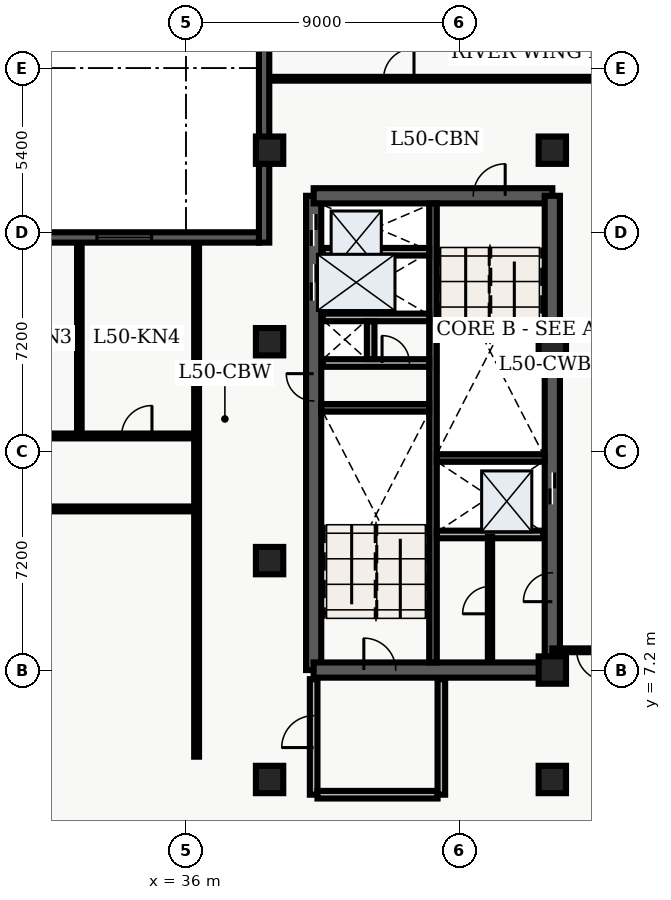
"""IFC4 building model, lengths in metres.
Left out: names, types, materials, properties, quantities, classifications, styles, units other than length and angle.
Written with IfcOpenShell. Run it as: python <this file> out.ifc"""

import sys

from ifc_helpers import new_model, entity, si_unit, converted_unit, direction, frame, origin_with_axes, origin_2d_with_axis, place, context, subcontext, project, spatial, polyline, rectangle, outline, extrude, element, fill, save


model = new_model("IFC4")
c1 = context("Model", 3, precision=1e-05, world=origin_with_axes(), true_north=direction((0.0, 1.0)))
c2 = subcontext(c1, "Body", "Model", "MODEL_VIEW")
j1 = project(units=[si_unit("LENGTHUNIT", "METRE"), converted_unit("PLANEANGLEUNIT", "DEGREE", entity("IfcPlaneAngleMeasure", 0.017), si_unit("PLANEANGLEUNIT", "RADIAN"), dimensions=[0, 0, 0, 0, 0, 0, 0])], contexts=[c1])
p1 = place(None, origin_with_axes())
s1 = spatial("IfcSite", under=j1, at=p1, CompositionType="ELEMENT")
p2 = place(p1, origin_with_axes())
s2 = spatial("IfcBuilding", under=s1, at=p2, CompositionType="ELEMENT")
p3 = place(p2, frame((0.0, 0.0, 204.3), z_axis=(0.0, 0.0, 1.0), x_axis=(1.0, 0.0, 0.0)))
s3 = spatial("IfcBuildingStorey", under=s2, at=p3, CompositionType="ELEMENT", Elevation=204.3)
p4 = place(p3, frame((40.2, 7.2, 0.0), z_axis=(0.0, 0.0, 1.0), x_axis=(0.0, 1.0, 0.0)))
e1 = element("IfcWall", 1, at=p4, inside=s3, PredefinedType="SHEAR", context=c2, shape_type="SweptSolid", body=[
    extrude(outline(polyline([(0.0, -0.25), (15.6, -0.25), (15.6, 0.25), (0.0, 0.25), (0.0, -0.25)])), origin_with_axes(), (0.0, 0.0, 1.0), 3.66),
])
p5 = place(p4, frame((14.475, 0.0, 0.0), z_axis=(0.0, 0.0, 1.0), x_axis=(1.0, 0.0, 0.0)))
e2 = element("IfcOpeningElement", 2, at=p5, cuts=e1, PredefinedType="OPENING", context=c2, shape_type="SweptSolid", body=[
    extrude(rectangle(XDim=1.05, YDim=0.52, at=origin_2d_with_axis()), origin_with_axes(), (0.0, 0.0, 1.0), 2.15),
])
p6 = place(p4, frame((12.75, 0.0, 0.0), z_axis=(0.0, 0.0, 1.0), x_axis=(1.0, 0.0, 0.0)))
e3 = element("IfcOpeningElement", 3, at=p6, cuts=e1, PredefinedType="OPENING", context=c2, shape_type="SweptSolid", body=[
    extrude(rectangle(XDim=1.2, YDim=0.52, at=origin_2d_with_axis()), origin_with_axes(), (0.0, 0.0, 1.0), 2.15),
])
p7 = place(p4, frame((9.3, 0.0, 0.0), z_axis=(0.0, 0.0, 1.0), x_axis=(1.0, 0.0, 0.0)))
e4 = element("IfcOpeningElement", 4, at=p7, cuts=e1, PredefinedType="OPENING", context=c2, shape_type="SweptSolid", body=[
    extrude(rectangle(XDim=0.9, YDim=0.52, at=origin_2d_with_axis()), origin_with_axes(), (0.0, 0.0, 1.0), 2.15),
])
p8 = place(p3, frame((40.2, 7.2, 0.0), z_axis=(0.0, 0.0, 1.0), x_axis=(1.0, 0.0, 0.0)))
e5 = element("IfcWall", 5, at=p8, inside=s3, PredefinedType="SHEAR", context=c2, shape_type="SweptSolid", body=[
    extrude(outline(polyline([(0.0, -0.25), (7.85, -0.25), (7.85, 0.25), (0.0, 0.25), (0.0, -0.25)])), origin_with_axes(), (0.0, 0.0, 1.0), 3.66),
])
p9 = place(p8, frame((2.175, 0.0, 0.0), z_axis=(0.0, 0.0, 1.0), x_axis=(1.0, 0.0, 0.0)))
e6 = element("IfcOpeningElement", 6, at=p9, cuts=e5, PredefinedType="OPENING", context=c2, shape_type="SweptSolid", body=[
    extrude(rectangle(XDim=1.05, YDim=0.52, at=origin_2d_with_axis()), origin_with_axes(), (0.0, 0.0, 1.0), 2.15),
])
p10 = place(p3, frame((40.2, 22.8, 0.0), z_axis=(0.0, 0.0, 1.0), x_axis=(1.0, 0.0, 0.0)))
e7 = element("IfcWall", 7, at=p10, inside=s3, PredefinedType="SHEAR", context=c2, shape_type="SweptSolid", body=[
    extrude(outline(polyline([(0.0, -0.25), (7.85, -0.25), (7.85, 0.25), (0.0, 0.25), (0.0, -0.25)])), origin_with_axes(), (0.0, 0.0, 1.0), 3.66),
])
p11 = place(p10, frame((5.775, 0.0, 0.0), z_axis=(0.0, 0.0, 1.0), x_axis=(1.0, 0.0, 0.0)))
e8 = element("IfcOpeningElement", 8, at=p11, cuts=e7, PredefinedType="OPENING", context=c2, shape_type="SweptSolid", body=[
    extrude(rectangle(XDim=1.05, YDim=0.52, at=origin_2d_with_axis()), origin_with_axes(), (0.0, 0.0, 1.0), 2.15),
])
p12 = place(p3, frame((48.05, 7.2, 0.0), z_axis=(0.0, 0.0, 1.0), x_axis=(0.0, 1.0, 0.0)))
e9 = element("IfcWall", 9, at=p12, inside=s3, PredefinedType="SHEAR", context=c2, shape_type="SweptSolid", body=[
    extrude(outline(polyline([(0.0, -0.25), (15.6, -0.25), (15.6, 0.25), (0.0, 0.25), (0.0, -0.25)])), origin_with_axes(), (0.0, 0.0, 1.0), 3.66),
])
p13 = place(p12, frame((5.975, 0.0, 0.0), z_axis=(0.0, 0.0, 1.0), x_axis=(1.0, 0.0, 0.0)))
e10 = element("IfcOpeningElement", 10, at=p13, cuts=e9, PredefinedType="OPENING", context=c2, shape_type="SweptSolid", body=[
    extrude(rectangle(XDim=1.05, YDim=0.52, at=origin_2d_with_axis()), origin_with_axes(), (0.0, 0.0, 1.0), 2.15),
])
p14 = place(p12, frame((2.725, 0.0, 0.0), z_axis=(0.0, 0.0, 1.0), x_axis=(1.0, 0.0, 0.0)))
e11 = element("IfcOpeningElement", 11, at=p14, cuts=e9, PredefinedType="OPENING", context=c2, shape_type="SweptSolid", body=[
    extrude(rectangle(XDim=0.95, YDim=0.52, at=origin_2d_with_axis()), origin_with_axes(), (0.0, 0.0, 1.0), 2.15),
])
p15 = place(p3, frame((44.125, 7.45, 0.0), z_axis=(0.0, 0.0, 1.0), x_axis=(0.0, 1.0, 0.0)))
e12 = element("IfcWall", 12, at=p15, inside=s3, PredefinedType="SHEAR", context=c2, shape_type="SweptSolid", body=[
    extrude(outline(polyline([(0.0, -0.125), (15.1, -0.125), (15.1, 0.125), (0.0, 0.125), (0.0, -0.125)])), origin_with_axes(), (0.0, 0.0, 1.0), 3.66),
])
for number, where, z_axis, x_axis in (
    (13, (40.45, 15.825, 0.0), (0.0, 0.0, 1.0), (1.0, 0.0, 0.0)),
    (14, (44.25, 14.175, 0.0), (0.0, 0.0, 1.0), (1.0, 0.0, 0.0)),
):
    element("IfcWall", number, at=place(p3, frame(where, z_axis=z_axis, x_axis=x_axis)), inside=s3, PredefinedType="SHEAR", context=c2, shape_type="SweptSolid", body=[
        extrude(outline(polyline([(0.0, -0.125), (3.55, -0.125), (3.55, 0.125), (0.0, 0.125), (0.0, -0.125)])), origin_with_axes(), (0.0, 0.0, 1.0), 3.66),
    ])
p16 = place(p3, frame((40.5, 17.3, 0.0), z_axis=(0.0, 0.0, 1.0), x_axis=(1.0, 0.0, 0.0)))
e15 = element("IfcWall", 15, at=p16, inside=s3, PredefinedType="SOLIDWALL", context=c2, shape_type="SweptSolid", body=[
    extrude(outline(polyline([(0.0, -0.125), (3.5, -0.125), (3.5, 0.125), (0.0, 0.125), (0.0, -0.125)])), origin_with_axes(), (0.0, 0.0, 1.0), 2.7),
])
p17 = place(p16, frame((2.4, 0.0, 0.0), z_axis=(0.0, 0.0, 1.0), x_axis=(1.0, 0.0, 0.0)))
e16 = element("IfcOpeningElement", 16, at=p17, cuts=e15, PredefinedType="OPENING", context=c2, shape_type="SweptSolid", body=[
    extrude(rectangle(XDim=0.9, YDim=0.27, at=origin_2d_with_axis()), origin_with_axes(), (0.0, 0.0, 1.0), 2.15),
])
p18 = place(p3, frame((40.5, 18.8, 0.0), z_axis=(0.0, 0.0, 1.0), x_axis=(1.0, 0.0, 0.0)))
e17 = element("IfcWall", 17, at=p18, inside=s3, PredefinedType="SOLIDWALL", context=c2, shape_type="SweptSolid", body=[
    extrude(outline(polyline([(0.0, -0.125), (3.5, -0.125), (3.5, 0.125), (0.0, 0.125), (0.0, -0.125)])), origin_with_axes(), (0.0, 0.0, 1.0), 2.7),
])
p19 = place(p3, frame((42.075, 17.43, 0.0), z_axis=(0.0, 0.0, 1.0), x_axis=(0.0, 1.0, 0.0)))
e18 = element("IfcWall", 18, at=p19, inside=s3, PredefinedType="SOLIDWALL", context=c2, shape_type="SweptSolid", body=[
    extrude(outline(polyline([(0.0, -0.125), (1.24, -0.125), (1.24, 0.125), (0.0, 0.125), (0.0, -0.125)])), origin_with_axes(), (0.0, 0.0, 1.0), 2.7),
])
p20 = place(p3, frame((40.2, 3.1, 0.0), z_axis=(0.0, 0.0, 1.0), x_axis=(0.0, 1.0, 0.0)))
e19 = element("IfcWall", 19, at=p20, inside=s3, PredefinedType="SOLIDWALL", context=c2, shape_type="SweptSolid", body=[
    extrude(outline(polyline([(0.0, -0.125), (3.8, -0.125), (3.8, 0.125), (0.0, 0.125), (0.0, -0.125)])), origin_with_axes(), (0.0, 0.0, 1.0), 2.7),
])
p21 = place(p20, frame((2.075, 0.0, 0.0), z_axis=(0.0, 0.0, 1.0), x_axis=(1.0, 0.0, 0.0)))
e20 = element("IfcOpeningElement", 20, at=p21, cuts=e19, PredefinedType="OPENING", context=c2, shape_type="SweptSolid", body=[
    extrude(rectangle(XDim=1.05, YDim=0.27, at=origin_2d_with_axis()), origin_with_axes(), (0.0, 0.0, 1.0), 2.15),
])
p22 = place(p3, frame((40.325, 3.1, 0.0), z_axis=(0.0, 0.0, 1.0), x_axis=(1.0, 0.0, 0.0)))
e21 = element("IfcWall", 21, at=p22, inside=s3, PredefinedType="SOLIDWALL", context=c2, shape_type="SweptSolid", body=[
    extrude(outline(polyline([(0.0, -0.125), (3.95, -0.125), (3.95, 0.125), (0.0, 0.125), (0.0, -0.125)])), origin_with_axes(), (0.0, 0.0, 1.0), 2.7),
])
p23 = place(p3, frame((44.4, 3.1, 0.0), z_axis=(0.0, 0.0, 1.0), x_axis=(0.0, 1.0, 0.0)))
e22 = element("IfcWall", 22, at=p23, inside=s3, PredefinedType="SOLIDWALL", context=c2, shape_type="SweptSolid", body=[
    extrude(outline(polyline([(0.0, -0.125), (3.8, -0.125), (3.8, 0.125), (0.0, 0.125), (0.0, -0.125)])), origin_with_axes(), (0.0, 0.0, 1.0), 2.7),
])
for number, where, z_axis, x_axis in (
    (23, (38.75, 3.6, 0.0), (0.0, 0.0, 1.0), (1.0, 0.0, 0.0)),
    (24, (38.75, 10.8, 0.0), (0.0, 0.0, 1.0), (1.0, 0.0, 0.0)),
    (25, (38.75, 18.0, 0.0), (0.0, 0.0, 1.0), (1.0, 0.0, 0.0)),
    (26, (38.75, 24.3, 0.0), (0.0, 0.0, 1.0), (1.0, 0.0, 0.0)),
    (27, (48.05, 3.6, 0.0), (0.0, 0.0, 1.0), (1.0, 0.0, 0.0)),
    (28, (48.05, 7.2, 0.0), (0.0, 0.0, 1.0), (1.0, 0.0, 0.0)),
    (29, (48.05, 18.0, 0.0), (0.0, 0.0, 1.0), (1.0, 0.0, 0.0)),
    (30, (48.05, 24.3, 0.0), (0.0, 0.0, 1.0), (1.0, 0.0, 0.0)),
):
    element("IfcColumn", number, at=place(p3, frame(where, z_axis=z_axis, x_axis=x_axis)), inside=s3, PredefinedType="COLUMN", context=c2, shape_type="SweptSolid", body=[
        extrude(rectangle(XDim=0.9, YDim=0.9, at=origin_2d_with_axis()), origin_with_axes(), (0.0, 0.0, 1.0), 3.9),
    ])
for number, where, z_axis, x_axis in (
    (31, (40.5, 20.96, 0.0), (0.0, 0.0, 1.0), (1.0, 0.0, 0.0)),
    (32, (44.25, 11.66, 0.0), (0.0, 0.0, 1.0), (1.0, 0.0, 0.0)),
):
    element("IfcWall", number, at=place(p3, frame(where, z_axis=z_axis, x_axis=x_axis)), inside=s3, PredefinedType="SOLIDWALL", context=c2, shape_type="SweptSolid", body=[
        extrude(outline(polyline([(0.0, -0.125), (3.5, -0.125), (3.5, 0.125), (0.0, 0.125), (0.0, -0.125)])), origin_with_axes(), (0.0, 0.0, 1.0), 2.7),
    ])
p24 = place(p3, frame((46.0, 7.5, 0.0), z_axis=(0.0, 0.0, 1.0), x_axis=(0.0, 1.0, 0.0)))
e33 = element("IfcWall", 33, at=p24, inside=s3, PredefinedType="PARTITIONING", context=c2, shape_type="SweptSolid", body=[
    extrude(outline(polyline([(0.0, -0.07), (4.08, -0.07), (4.08, 0.07), (0.0, 0.07), (0.0, -0.07)])), origin_with_axes(), (0.0, 0.0, 1.0), 2.7),
])
p25 = place(p24, frame((2.0, 0.0, 0.0), z_axis=(0.0, 0.0, 1.0), x_axis=(1.0, 0.0, 0.0)))
e34 = element("IfcOpeningElement", 34, at=p25, cuts=e33, PredefinedType="OPENING", context=c2, shape_type="SweptSolid", body=[
    extrude(rectangle(XDim=0.9, YDim=0.16, at=origin_2d_with_axis()), origin_with_axes(), (0.0, 0.0, 1.0), 2.15),
])
p26 = place(p3, frame((21.15, 12.5, 0.0), z_axis=(0.0, 0.0, 1.0), x_axis=(1.0, 0.0, 0.0)))
e35 = element("IfcWall", 35, at=p26, inside=s3, PredefinedType="PARTITIONING", context=c2, shape_type="SweptSolid", body=[
    extrude(outline(polyline([(0.0, -0.08), (15.2, -0.08), (15.2, 0.08), (0.0, 0.08), (0.0, -0.08)])), origin_with_axes(), (0.0, 0.0, 1.0), 2.7),
])
p27 = place(p26, frame((7.65, 0.0, 0.0), z_axis=(0.0, 0.0, 1.0), x_axis=(1.0, 0.0, 0.0)))
e36 = element("IfcOpeningElement", 36, at=p27, cuts=e35, PredefinedType="OPENING", context=c2, shape_type="SweptSolid", body=[
    extrude(rectangle(XDim=1.0, YDim=0.18, at=origin_2d_with_axis()), origin_with_axes(), (0.0, 0.0, 1.0), 2.15),
])
p28 = place(p3, frame((21.15, 14.9, 0.0), z_axis=(0.0, 0.0, 1.0), x_axis=(1.0, 0.0, 0.0)))
e37 = element("IfcWall", 37, at=p28, inside=s3, PredefinedType="PARTITIONING", context=c2, shape_type="SweptSolid", body=[
    extrude(outline(polyline([(0.0, -0.08), (15.2, -0.08), (15.2, 0.08), (0.0, 0.08), (0.0, -0.08)])), origin_with_axes(), (0.0, 0.0, 1.0), 2.7),
])
p29 = place(p28, frame((2.57, 0.0, 0.0), z_axis=(0.0, 0.0, 1.0), x_axis=(1.0, 0.0, 0.0)))
e38 = element("IfcOpeningElement", 38, at=p29, cuts=e37, PredefinedType="OPENING", context=c2, shape_type="SweptSolid", body=[
    extrude(rectangle(XDim=1.0, YDim=0.18, at=origin_2d_with_axis()), origin_with_axes(), (0.0, 0.0, 1.0), 2.15),
])
p30 = place(p28, frame((6.476, 0.0, 0.0), z_axis=(0.0, 0.0, 1.0), x_axis=(1.0, 0.0, 0.0)))
e39 = element("IfcOpeningElement", 39, at=p30, cuts=e37, PredefinedType="OPENING", context=c2, shape_type="SweptSolid", body=[
    extrude(rectangle(XDim=1.0, YDim=0.18, at=origin_2d_with_axis()), origin_with_axes(), (0.0, 0.0, 1.0), 2.15),
])
p31 = place(p28, frame((9.667, 0.0, 0.0), z_axis=(0.0, 0.0, 1.0), x_axis=(1.0, 0.0, 0.0)))
e40 = element("IfcOpeningElement", 40, at=p31, cuts=e37, PredefinedType="OPENING", context=c2, shape_type="SweptSolid", body=[
    extrude(rectangle(XDim=1.0, YDim=0.18, at=origin_2d_with_axis()), origin_with_axes(), (0.0, 0.0, 1.0), 2.15),
])
p32 = place(p28, frame((13.232, 0.0, 0.0), z_axis=(0.0, 0.0, 1.0), x_axis=(1.0, 0.0, 0.0)))
e41 = element("IfcOpeningElement", 41, at=p32, cuts=e37, PredefinedType="OPENING", context=c2, shape_type="SweptSolid", body=[
    extrude(rectangle(XDim=1.0, YDim=0.18, at=origin_2d_with_axis()), origin_with_axes(), (0.0, 0.0, 1.0), 2.15),
])
p33 = place(p3, frame((36.35, 4.35, 0.0), z_axis=(0.0, 0.0, 1.0), x_axis=(0.0, 1.0, 0.0)))
e42 = element("IfcWall", 42, at=p33, inside=s3, PredefinedType="PARTITIONING", context=c2, shape_type="SweptSolid", body=[
    extrude(outline(polyline([(0.0, -0.08), (16.95, -0.08), (16.95, 0.08), (0.0, 0.08), (0.0, -0.08)])), origin_with_axes(), (0.0, 0.0, 1.0), 2.7),
])
p34 = place(p3, frame((32.493, 15.02, 0.0), z_axis=(0.0, 0.0, 1.0), x_axis=(0.0, 1.0, 0.0)))
e43 = element("IfcWall", 43, at=p34, inside=s3, PredefinedType="PARTITIONING", context=c2, shape_type="SweptSolid", body=[
    extrude(outline(polyline([(0.0, -0.075), (6.245, -0.075), (6.245, 0.075), (0.0, 0.075), (0.0, -0.075)])), origin_with_axes(), (0.0, 0.0, 1.0), 2.7),
])
p35 = place(p3, frame((59.665, 7.85, 0.0), z_axis=(0.0, 0.0, 1.0), x_axis=(-1.0, 0.0, 0.0)))
e44 = element("IfcWall", 44, at=p35, inside=s3, PredefinedType="PARTITIONING", context=c2, shape_type="SweptSolid", body=[
    extrude(outline(polyline([(0.0, -0.062), (11.615, -0.062), (11.615, 0.062), (0.0, 0.062), (0.0, -0.062)])), origin_with_axes(), (0.0, 0.0, 1.0), 2.7),
])
p36 = place(p35, frame((10.315, 0.0, 0.0), z_axis=(0.0, 0.0, 1.0), x_axis=(1.0, 0.0, 0.0)))
e45 = element("IfcOpeningElement", 45, at=p36, cuts=e44, PredefinedType="OPENING", context=c2, shape_type="SweptSolid", body=[
    extrude(rectangle(XDim=1.0, YDim=0.145, at=origin_2d_with_axis()), origin_with_axes(), (0.0, 0.0, 1.0), 2.15),
])
p37 = place(p3, frame((38.735, 26.65, 0.0), z_axis=(0.0, 0.0, 1.0), x_axis=(1.0, 0.0, 0.0)))
e46 = element("IfcWall", 46, at=p37, inside=s3, PredefinedType="PARTITIONING", context=c2, shape_type="SweptSolid", body=[
    extrude(outline(polyline([(0.0, -0.062), (20.905, -0.062), (20.905, 0.062), (0.0, 0.062), (0.0, -0.062)])), origin_with_axes(), (0.0, 0.0, 1.0), 2.7),
])
p38 = place(p37, frame((4.265, 0.0, 0.0), z_axis=(0.0, 0.0, 1.0), x_axis=(1.0, 0.0, 0.0)))
e47 = element("IfcOpeningElement", 47, at=p38, cuts=e46, PredefinedType="OPENING", context=c2, shape_type="SweptSolid", body=[
    extrude(rectangle(XDim=1.0, YDim=0.145, at=origin_2d_with_axis()), origin_with_axes(), (0.0, 0.0, 1.0), 2.15),
])
p39 = place(p3, frame((38.57, 21.26, 0.0), z_axis=(0.0, 0.0, 1.0), x_axis=(0.0, 1.0, 0.0)))
e48 = element("IfcWall", 48, at=p39, inside=s3, PredefinedType="SOLIDWALL", context=c2, shape_type="SweptSolid", body=[
    extrude(outline(polyline([(0.0, -0.17), (7.54, -0.17), (7.54, 0.17), (0.0, 0.17), (0.0, -0.17)])), origin_with_axes(), (0.0, 0.0, 1.0), 3.66),
])
p40 = place(p3, frame((29.541, 21.43, 0.0), z_axis=(0.0, 0.0, 1.0), x_axis=(1.0, 0.0, 0.0)))
e49 = element("IfcWall", 49, at=p40, inside=s3, PredefinedType="SOLIDWALL", context=c2, shape_type="SweptSolid", body=[
    extrude(outline(polyline([(0.0, -0.17), (8.859, -0.17), (8.859, 0.17), (0.0, 0.17), (0.0, -0.17)])), origin_with_axes(), (0.0, 0.0, 1.0), 3.66),
])
p41 = place(p40, frame((4.429, 0.0, 0.45), z_axis=(0.0, 0.0, 1.0), x_axis=(1.0, 0.0, 0.0)))
e50 = element("IfcOpeningElement", 50, at=p41, cuts=e49, PredefinedType="OPENING", context=c2, shape_type="SweptSolid", body=[
    extrude(rectangle(XDim=1.8, YDim=0.36, at=origin_2d_with_axis()), origin_with_axes(), (0.0, 0.0, 1.0), 2.1),
])
p42 = place(p12, frame((5.975, 0.0, 0.0), z_axis=(0.0, 0.0, 1.0), x_axis=(1.0, 0.0, 0.0)))
e51 = element("IfcDoor", 51, at=p42, inside=s3, OperationType="SLIDING_TO_LEFT", PredefinedType="DOOR", context=c2, shape_type="SweptSolid", body=[
    extrude(rectangle(XDim=1.05, YDim=0.09, at=origin_2d_with_axis()), origin_with_axes(), (0.0, 0.0, 1.0), 2.15),
])
fill(e10, e51)
p43 = place(p4, frame((14.475, 0.0, 0.0), z_axis=(0.0, 0.0, 1.0), x_axis=(1.0, 0.0, 0.0)))
e52 = element("IfcDoor", 52, at=p43, inside=s3, OperationType="SLIDING_TO_RIGHT", PredefinedType="DOOR", context=c2, shape_type="SweptSolid", body=[
    extrude(rectangle(XDim=1.05, YDim=0.09, at=origin_2d_with_axis()), origin_with_axes(), (0.0, 0.0, 1.0), 2.15),
])
fill(e2, e52)
p44 = place(p4, frame((12.75, 0.0, 0.0), z_axis=(0.0, 0.0, 1.0), x_axis=(1.0, 0.0, 0.0)))
e53 = element("IfcDoor", 53, at=p44, inside=s3, OperationType="DOUBLE_DOOR_SLIDING", PredefinedType="DOOR", context=c2, shape_type="SweptSolid", body=[
    extrude(rectangle(XDim=1.2, YDim=0.09, at=origin_2d_with_axis()), origin_with_axes(), (0.0, 0.0, 1.0), 2.15),
])
fill(e3, e53)
p45 = place(p4, frame((9.3, 0.0, 0.0), z_axis=(0.0, 0.0, 1.0), x_axis=(1.0, 0.0, 0.0)))
e54 = element("IfcDoor", 54, at=p45, inside=s3, OperationType="SINGLE_SWING_RIGHT", PredefinedType="DOOR", context=c2, shape_type="SweptSolid", body=[
    extrude(rectangle(XDim=0.9, YDim=0.09, at=origin_2d_with_axis()), origin_with_axes(), (0.0, 0.0, 1.0), 2.15),
])
fill(e4, e54)
p46 = place(p16, frame((2.4, 0.0, 0.0), z_axis=(0.0, 0.0, 1.0), x_axis=(1.0, 0.0, 0.0)))
e55 = element("IfcDoor", 55, at=p46, inside=s3, OperationType="SINGLE_SWING_LEFT", PredefinedType="DOOR", context=c2, shape_type="SweptSolid", body=[
    extrude(rectangle(XDim=0.9, YDim=0.09, at=origin_2d_with_axis()), origin_with_axes(), (0.0, 0.0, 1.0), 2.15),
])
fill(e16, e55)
p47 = place(p8, frame((2.175, 0.0, 0.0), z_axis=(0.0, 0.0, 1.0), x_axis=(1.0, 0.0, 0.0)))
e56 = element("IfcDoor", 56, at=p47, inside=s3, OperationType="SINGLE_SWING_LEFT", PredefinedType="DOOR", context=c2, shape_type="SweptSolid", body=[
    extrude(rectangle(XDim=1.05, YDim=0.09, at=origin_2d_with_axis()), origin_with_axes(), (0.0, 0.0, 1.0), 2.15),
])
fill(e6, e56)
p48 = place(p10, frame((5.775, 0.0, 0.0), z_axis=(0.0, 0.0, 1.0), x_axis=(1.0, 0.0, 0.0)))
e57 = element("IfcDoor", 57, at=p48, inside=s3, OperationType="SINGLE_SWING_RIGHT", PredefinedType="DOOR", context=c2, shape_type="SweptSolid", body=[
    extrude(rectangle(XDim=1.05, YDim=0.09, at=origin_2d_with_axis()), origin_with_axes(), (0.0, 0.0, 1.0), 2.15),
])
fill(e8, e57)
p49 = place(p20, frame((2.075, 0.0, 0.0), z_axis=(0.0, 0.0, 1.0), x_axis=(1.0, 0.0, 0.0)))
e58 = element("IfcDoor", 58, at=p49, inside=s3, OperationType="SINGLE_SWING_LEFT", PredefinedType="DOOR", context=c2, shape_type="SweptSolid", body=[
    extrude(rectangle(XDim=1.05, YDim=0.09, at=origin_2d_with_axis()), origin_with_axes(), (0.0, 0.0, 1.0), 2.15),
])
fill(e20, e58)
p50 = place(p24, frame((2.0, 0.0, 0.0), z_axis=(0.0, 0.0, 1.0), x_axis=(1.0, 0.0, 0.0)))
e59 = element("IfcDoor", 59, at=p50, inside=s3, OperationType="SINGLE_SWING_LEFT", PredefinedType="DOOR", context=c2, shape_type="SweptSolid", body=[
    extrude(rectangle(XDim=0.9, YDim=0.084, at=origin_2d_with_axis()), origin_with_axes(), (0.0, 0.0, 1.0), 2.15),
])
fill(e34, e59)
p51 = place(p12, frame((2.725, 0.0, 0.0), z_axis=(0.0, 0.0, 1.0), x_axis=(1.0, 0.0, 0.0)))
e60 = element("IfcDoor", 60, at=p51, inside=s3, OperationType="SINGLE_SWING_LEFT", PredefinedType="DOOR", context=c2, shape_type="SweptSolid", body=[
    extrude(rectangle(XDim=0.95, YDim=0.09, at=origin_2d_with_axis()), origin_with_axes(), (0.0, 0.0, 1.0), 2.15),
])
fill(e11, e60)
p52 = place(p28, frame((13.232, 0.0, 0.0), z_axis=(0.0, 0.0, 1.0), x_axis=(1.0, 0.0, 0.0)))
e61 = element("IfcDoor", 61, at=p52, inside=s3, OperationType="SINGLE_SWING_RIGHT", PredefinedType="DOOR", context=c2, shape_type="SweptSolid", body=[
    extrude(rectangle(XDim=1.0, YDim=0.09, at=origin_2d_with_axis()), origin_with_axes(), (0.0, 0.0, 1.0), 2.15),
])
fill(e41, e61)
p53 = place(p35, frame((10.315, 0.0, 0.0), z_axis=(0.0, 0.0, 1.0), x_axis=(1.0, 0.0, 0.0)))
e62 = element("IfcDoor", 62, at=p53, inside=s3, OperationType="SINGLE_SWING_LEFT", PredefinedType="DOOR", context=c2, shape_type="SweptSolid", body=[
    extrude(rectangle(XDim=1.0, YDim=0.075, at=origin_2d_with_axis()), origin_with_axes(), (0.0, 0.0, 1.0), 2.15),
])
fill(e45, e62)
p54 = place(p37, frame((4.265, 0.0, 0.0), z_axis=(0.0, 0.0, 1.0), x_axis=(1.0, 0.0, 0.0)))
e63 = element("IfcDoor", 63, at=p54, inside=s3, OperationType="SINGLE_SWING_RIGHT", PredefinedType="DOOR", context=c2, shape_type="SweptSolid", body=[
    extrude(rectangle(XDim=1.0, YDim=0.075, at=origin_2d_with_axis()), origin_with_axes(), (0.0, 0.0, 1.0), 2.15),
])
fill(e47, e63)
p55 = place(p40, frame((4.429, 0.0, 0.45), z_axis=(0.0, 0.0, 1.0), x_axis=(1.0, 0.0, 0.0)))
e64 = element("IfcWindow", 64, at=p55, inside=s3, PredefinedType="WINDOW", context=c2, shape_type="SweptSolid", body=[
    extrude(rectangle(XDim=1.8, YDim=0.09, at=origin_2d_with_axis()), origin_with_axes(), (0.0, 0.0, 1.0), 2.1),
])
fill(e50, e64)
save(model, sys.argv[1])
